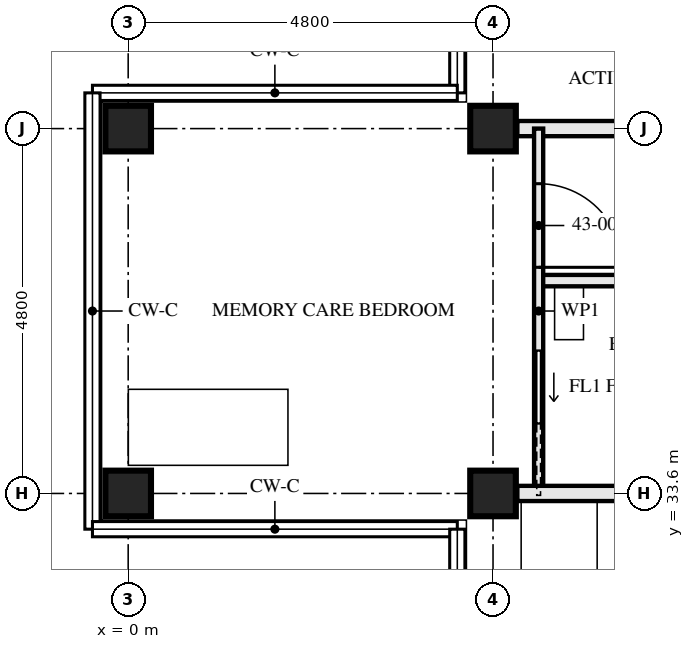
"""IFC4 building model, lengths in metres.
Left out: names, types, materials, properties, quantities, classifications, styles, units other than length and angle.
Written with IfcOpenShell. Run it as: python <this file> out.ifc"""

import sys

from ifc_helpers import new_model, si_unit, direction, frame, frame_2d, origin, origin_2d, place, context, subcontext, project, spatial, rectangle, hollow_rectangle, extrude, element, fill, save


model = new_model("IFC4")
c1 = context("Model", 3, precision=1e-05, world=origin(), true_north=direction((0.0, 1.0)))
c2 = subcontext(c1, "Body", "Model", "MODEL_VIEW")
j1 = project(units=[si_unit("LENGTHUNIT", "METRE"), si_unit("PLANEANGLEUNIT", "RADIAN")], contexts=[c1])
p1 = place(None, origin())
s1 = spatial("IfcSite", under=j1, at=p1, CompositionType="ELEMENT")
p2 = place(p1, origin())
s2 = spatial("IfcBuilding", under=s1, at=p2, CompositionType="ELEMENT")
p3 = place(p2, frame((0.0, 0.0, 158.5)))
s3 = spatial("IfcBuildingStorey", under=s2, at=p3, CompositionType="ELEMENT", Elevation=158.5)
for number, where, z_axis, x_axis in (
    (1, (0.0, 33.6, 0.0), (0.0, 0.0, 1.0), (0.0, 1.0, 0.0)),
    (2, (0.0, 38.4, 0.0), (0.0, 0.0, 1.0), (0.0, 1.0, 0.0)),
    (3, (4.8, 33.6, 0.0), (0.0, 0.0, 1.0), (0.0, 1.0, 0.0)),
    (4, (4.8, 38.4, 0.0), (0.0, 0.0, 1.0), (0.0, 1.0, 0.0)),
):
    element("IfcColumn", number, at=place(p3, frame(where, z_axis=z_axis, x_axis=x_axis)), inside=s3, PredefinedType="COLUMN", context=c2, shape_type="SweptSolid", body=[
        extrude(hollow_rectangle(XDim=0.6, YDim=0.6, WallThickness=0.06, at=origin_2d()), origin(), (0.0, 0.0, 1.0), 3.5),
    ])
p4 = place(p3, frame((5.12, 38.4, 0.0), z_axis=(0.0, 0.0, 1.0), x_axis=(1.0, 0.0, 0.0)))
e5 = element("IfcWall", 5, at=p4, inside=s3, PredefinedType="PARTITIONING", context=c2, shape_type="SweptSolid", body=[
    extrude(rectangle(XDim=7.28, YDim=0.2, at=frame_2d((3.64, 0.0))), origin(), (0.0, 0.0, 1.0), 2.55),
])
p5 = place(p3, frame((5.4, 36.4, 0.0), z_axis=(0.0, 0.0, 1.0), x_axis=(1.0, 0.0, 0.0)))
e6 = element("IfcWall", 6, at=p5, inside=s3, PredefinedType="PARTITIONING", context=c2, shape_type="SweptSolid", body=[
    extrude(rectangle(XDim=3.0, YDim=0.15, at=frame_2d((1.5, 0.0))), origin(), (0.0, 0.0, 1.0), 3.33),
])
p6 = place(p3, frame((5.4, 38.4, 0.0), z_axis=(0.0, 0.0, 1.0), x_axis=(0.0, -1.0, 0.0)))
e7 = element("IfcWall", 7, at=p6, inside=s3, PredefinedType="PARTITIONING", context=c2, shape_type="SweptSolid", body=[
    extrude(rectangle(XDim=4.8, YDim=0.12, at=frame_2d((2.4, 0.0))), origin(), (0.0, 0.0, 1.0), 3.33),
])
p7 = place(p6, frame((0.725, 0.0, 0.0)))
e8 = element("IfcOpeningElement", 8, at=p7, cuts=e7, PredefinedType="OPENING", context=c2, shape_type="SweptSolid", body=[
    extrude(rectangle(XDim=1.1, YDim=2.1, at=frame_2d((0.55, 1.05))), frame((0.0, 0.071, 0.0), z_axis=(0.0, -1.0, 0.0), x_axis=(1.0, 0.0, 0.0)), (0.0, 0.0, 1.0), 0.141),
])
p8 = place(p6, frame((2.925, 0.0, 0.0)))
e9 = element("IfcOpeningElement", 9, at=p8, cuts=e7, PredefinedType="OPENING", context=c2, shape_type="SweptSolid", body=[
    extrude(rectangle(XDim=0.95, YDim=2.1, at=frame_2d((0.475, 1.05))), frame((0.0, 0.071, 0.0), z_axis=(0.0, -1.0, 0.0), x_axis=(1.0, 0.0, 0.0)), (0.0, 0.0, 1.0), 0.141),
])
p9 = place(p3, frame((5.12, 33.6, 0.0), z_axis=(0.0, 0.0, 1.0), x_axis=(1.0, 0.0, 0.0)))
e10 = element("IfcWall", 10, at=p9, inside=s3, PredefinedType="PARTITIONING", context=c2, shape_type="SweptSolid", body=[
    extrude(rectangle(XDim=7.28, YDim=0.2, at=frame_2d((3.64, 0.0))), origin(), (0.0, 0.0, 1.0), 2.55),
])
p10 = place(p7, origin())
e11 = element("IfcDoor", 11, at=p10, inside=s3, OperationType="SINGLE_SWING_LEFT", PredefinedType="DOOR", context=c2, shape_type="SweptSolid", body=[
    extrude(rectangle(XDim=1.1, YDim=2.1, at=frame_2d((0.55, 1.05))), frame((0.0, 0.022, 0.0), z_axis=(0.0, -1.0, 0.0), x_axis=(1.0, 0.0, 0.0)), (0.0, 0.0, 1.0), 0.044),
])
fill(e8, e11)
p11 = place(p8, origin())
e12 = element("IfcDoor", 12, at=p11, inside=s3, OperationType="SLIDING_TO_LEFT", PredefinedType="DOOR", context=c2, shape_type="SweptSolid", body=[
    extrude(rectangle(XDim=0.95, YDim=2.1, at=frame_2d((0.475, 1.05))), frame((0.0, 0.022, 0.0), z_axis=(0.0, -1.0, 0.0), x_axis=(1.0, 0.0, 0.0)), (0.0, 0.0, 1.0), 0.044),
])
fill(e9, e12)
save(model, sys.argv[1])
